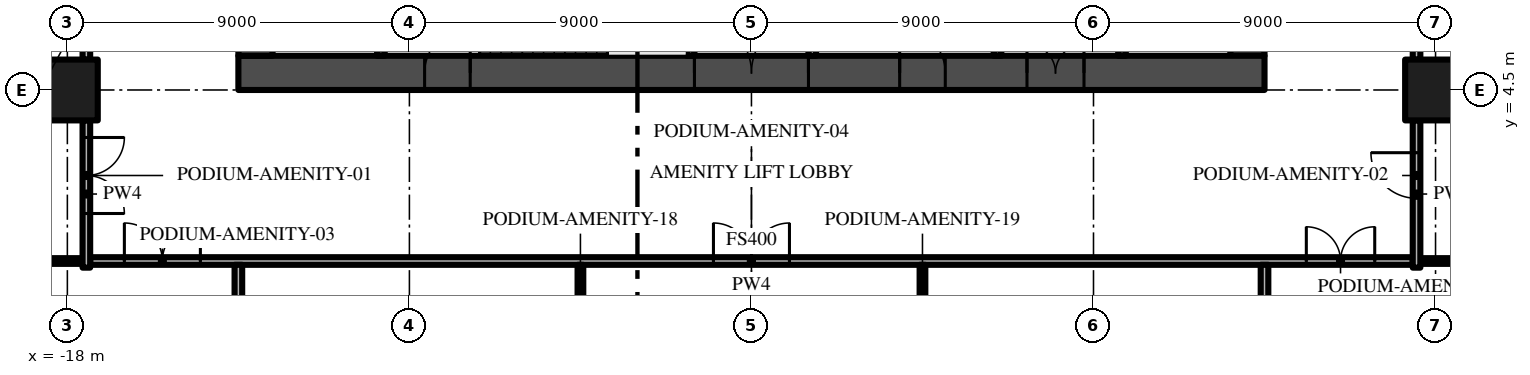
"""IFC4 building model, lengths in metres.
Left out: names, types, materials, properties, quantities, classifications, styles, units other than length and angle.
Written with IfcOpenShell. Run it as: python <this file> out.ifc"""

import sys

from ifc_helpers import new_model, si_unit, direction, frame, frame_2d, origin, origin_2d, place, context, subcontext, project, spatial, rectangle, extrude, element, fill, save


model = new_model("IFC4")
c1 = context("Model", 3, precision=1e-05, world=origin(), true_north=direction((0.0, 1.0)))
c2 = subcontext(c1, "Body", "Model", "MODEL_VIEW")
j1 = project(units=[si_unit("LENGTHUNIT", "METRE"), si_unit("PLANEANGLEUNIT", "RADIAN")], contexts=[c1])
p1 = place(None, origin())
s1 = spatial("IfcSite", under=j1, at=p1, CompositionType="ELEMENT")
p2 = place(p1, origin())
s2 = spatial("IfcBuilding", under=s1, at=p2, CompositionType="ELEMENT")
p3 = place(p2, frame((0.0, 0.0, 6.0)))
s3 = spatial("IfcBuildingStorey", under=s2, at=p3, CompositionType="ELEMENT", Elevation=6.0)
p4 = place(p3, frame((-13.5, 4.95, -0.4), z_axis=(0.0, 0.0, 1.0), x_axis=(1.0, 0.0, 0.0)))
e1 = element("IfcWall", 1, at=p4, inside=s3, PredefinedType="SHEAR", context=c2, shape_type="SweptSolid", body=[
    extrude(rectangle(XDim=27.0, YDim=0.9, at=frame_2d((13.5, 0.0))), origin(), (0.0, 0.0, 1.0), 4.55),
])
p5 = place(p4, frame((12.0, 0.0, 0.4)))
e2 = element("IfcOpeningElement", 2, at=p5, cuts=e1, PredefinedType="OPENING", context=c2, shape_type="SweptSolid", body=[
    extrude(rectangle(XDim=3.0, YDim=2.4, at=frame_2d((1.5, 1.2))), frame((0.0, 0.46, 0.0), z_axis=(0.0, -1.0, 0.0), x_axis=(1.0, 0.0, 0.0)), (0.0, 0.0, 1.0), 0.92),
])
p6 = place(p4, frame((4.9, 0.0, 0.4)))
e3 = element("IfcOpeningElement", 3, at=p6, cuts=e1, PredefinedType="OPENING", context=c2, shape_type="SweptSolid", body=[
    extrude(rectangle(XDim=1.2, YDim=2.2, at=frame_2d((0.6, 1.1))), frame((0.0, 0.46, 0.0), z_axis=(0.0, -1.0, 0.0), x_axis=(1.0, 0.0, 0.0)), (0.0, 0.0, 1.0), 0.92),
])
p7 = place(p4, frame((20.75, 0.0, 0.4)))
e4 = element("IfcOpeningElement", 4, at=p7, cuts=e1, PredefinedType="OPENING", context=c2, shape_type="SweptSolid", body=[
    extrude(rectangle(XDim=1.5, YDim=2.2, at=frame_2d((0.75, 1.1))), frame((0.0, 0.46, 0.0), z_axis=(0.0, -1.0, 0.0), x_axis=(1.0, 0.0, 0.0)), (0.0, 0.0, 1.0), 0.92),
])
p8 = place(p4, frame((17.4, 0.0, 0.4)))
e5 = element("IfcOpeningElement", 5, at=p8, cuts=e1, PredefinedType="OPENING", context=c2, shape_type="SweptSolid", body=[
    extrude(rectangle(XDim=1.2, YDim=2.2, at=frame_2d((0.6, 1.1))), frame((0.0, 0.46, 0.0), z_axis=(0.0, -1.0, 0.0), x_axis=(1.0, 0.0, 0.0)), (0.0, 0.0, 1.0), 0.92),
])
p9 = place(p3, frame((13.05, 5.4, -0.4), z_axis=(0.0, 0.0, 1.0), x_axis=(0.0, 1.0, 0.0)))
e6 = element("IfcWall", 6, at=p9, inside=s3, PredefinedType="SHEAR", context=c2, shape_type="SweptSolid", body=[
    extrude(rectangle(XDim=16.2, YDim=0.9, at=frame_2d((8.1, 0.0))), origin(), (0.0, 0.0, 1.0), 4.55),
])
p10 = place(p9, frame((6.0, 0.0, 0.4)))
e7 = element("IfcOpeningElement", 7, at=p10, cuts=e6, PredefinedType="OPENING", context=c2, shape_type="SweptSolid", body=[
    extrude(rectangle(XDim=1.2, YDim=2.2, at=frame_2d((0.6, 1.1))), frame((0.0, 0.46, 0.0), z_axis=(0.0, -1.0, 0.0), x_axis=(1.0, 0.0, 0.0)), (0.0, 0.0, 1.0), 0.92),
])
p11 = place(p3, frame((-13.05, 21.6, -0.4), z_axis=(0.0, 0.0, 1.0), x_axis=(0.0, -1.0, 0.0)))
e8 = element("IfcWall", 8, at=p11, inside=s3, PredefinedType="SHEAR", context=c2, shape_type="SweptSolid", body=[
    extrude(rectangle(XDim=16.2, YDim=0.9, at=frame_2d((8.1, 0.0))), origin(), (0.0, 0.0, 1.0), 4.55),
])
p12 = place(p11, frame((9.0, 0.0, 0.4)))
e9 = element("IfcOpeningElement", 9, at=p12, cuts=e8, PredefinedType="OPENING", context=c2, shape_type="SweptSolid", body=[
    extrude(rectangle(XDim=1.2, YDim=2.2, at=frame_2d((0.6, 1.1))), frame((0.0, 0.46, 0.0), z_axis=(0.0, -1.0, 0.0), x_axis=(1.0, 0.0, 0.0)), (0.0, 0.0, 1.0), 0.92),
])
for number, where, z_axis, x_axis in (
    (10, (-18.0, 4.5, 0.0), (0.0, 0.0, 1.0), (1.0, 0.0, 0.0)),
    (11, (18.0, 4.5, 0.0), (0.0, 0.0, 1.0), (1.0, 0.0, 0.0)),
):
    element("IfcColumn", number, at=place(p3, frame(where, z_axis=z_axis, x_axis=x_axis)), inside=s3, PredefinedType="COLUMN", context=c2, shape_type="SweptSolid", body=[
        extrude(rectangle(XDim=1.6, YDim=1.6, at=origin_2d()), origin(), (0.0, 0.0, 1.0), 4.15),
    ])
for number, where, z_axis, x_axis in (
    (12, (-9.75, 5.4, 0.0), (0.0, 0.0, 1.0), (0.0, 1.0, 0.0)),
    (13, (-1.6, 5.4, 0.0), (0.0, 0.0, 1.0), (0.0, 1.0, 0.0)),
):
    element("IfcWall", number, at=place(p3, frame(where, z_axis=z_axis, x_axis=x_axis)), inside=s3, PredefinedType="SHEAR", context=c2, shape_type="SweptSolid", body=[
        extrude(rectangle(XDim=2.55, YDim=0.2, at=frame_2d((1.275, 0.0))), origin(), (0.0, 0.0, 1.0), 4.15),
    ])
p13 = place(p3, frame((1.6, 7.5, 0.0), z_axis=(0.0, 0.0, 1.0), x_axis=(0.0, -1.0, 0.0)))
e14 = element("IfcWall", 14, at=p13, inside=s3, PredefinedType="PARTITIONING", context=c2, shape_type="SweptSolid", body=[
    extrude(rectangle(XDim=2.1, YDim=0.2, at=frame_2d((1.05, 0.0))), origin(), (0.0, 0.0, 1.0), 4.15),
])
p14 = place(p13, frame((0.25, 0.0, 0.0)))
e15 = element("IfcOpeningElement", 15, at=p14, cuts=e14, PredefinedType="OPENING", context=c2, shape_type="SweptSolid", body=[
    extrude(rectangle(XDim=0.9, YDim=2.1, at=frame_2d((0.45, 1.05))), frame((0.0, 0.11, 0.0), z_axis=(0.0, -1.0, 0.0), x_axis=(1.0, 0.0, 0.0)), (0.0, 0.0, 1.0), 0.22),
])
p15 = place(p3, frame((6.475, 5.4, 0.0), z_axis=(0.0, 0.0, 1.0), x_axis=(0.0, 1.0, 0.0)))
e16 = element("IfcWall", 16, at=p15, inside=s3, PredefinedType="SHEAR", context=c2, shape_type="SweptSolid", body=[
    extrude(rectangle(XDim=2.1, YDim=0.2, at=frame_2d((1.05, 0.0))), origin(), (0.0, 0.0, 1.0), 4.15),
])
p16 = place(p3, frame((9.75, 5.4, 0.0), z_axis=(0.0, 0.0, 1.0), x_axis=(0.0, 1.0, 0.0)))
e17 = element("IfcWall", 17, at=p16, inside=s3, PredefinedType="SHEAR", context=c2, shape_type="SweptSolid", body=[
    extrude(rectangle(XDim=2.2, YDim=0.2, at=frame_2d((1.1, 0.0))), origin(), (0.0, 0.0, 1.0), 4.15),
])
p17 = place(p16, frame((0.55, 0.0, 0.0)))
e18 = element("IfcOpeningElement", 18, at=p17, cuts=e17, PredefinedType="OPENING", context=c2, shape_type="SweptSolid", body=[
    extrude(rectangle(XDim=1.1, YDim=2.1, at=frame_2d((0.55, 1.05))), frame((0.0, 0.11, 0.0), z_axis=(0.0, -1.0, 0.0), x_axis=(1.0, 0.0, 0.0)), (0.0, 0.0, 1.0), 0.22),
])
p18 = place(p3, frame((-17.4, 0.0, 0.0), z_axis=(0.0, 0.0, 1.0), x_axis=(1.0, 0.0, 0.0)))
e19 = element("IfcWall", 19, at=p18, inside=s3, PredefinedType="PARTITIONING", context=c2, shape_type="SweptSolid", body=[
    extrude(rectangle(XDim=34.8, YDim=0.2, at=frame_2d((17.4, 0.0))), origin(), (0.0, 0.0, 1.0), 4.15),
])
p19 = place(p18, frame((0.9, 0.0, 0.0)))
e20 = element("IfcOpeningElement", 20, at=p19, cuts=e19, PredefinedType="OPENING", context=c2, shape_type="SweptSolid", body=[
    extrude(rectangle(XDim=2.0, YDim=2.4, at=frame_2d((1.0, 1.2))), frame((0.0, 0.11, 0.0), z_axis=(0.0, -1.0, 0.0), x_axis=(1.0, 0.0, 0.0)), (0.0, 0.0, 1.0), 0.22),
])
p20 = place(p18, frame((16.4, 0.0, 0.0)))
e21 = element("IfcOpeningElement", 21, at=p20, cuts=e19, PredefinedType="OPENING", context=c2, shape_type="SweptSolid", body=[
    extrude(rectangle(XDim=2.0, YDim=2.4, at=frame_2d((1.0, 1.2))), frame((0.0, 0.11, 0.0), z_axis=(0.0, -1.0, 0.0), x_axis=(1.0, 0.0, 0.0)), (0.0, 0.0, 1.0), 0.22),
])
p21 = place(p18, frame((32.0, 0.0, 0.0)))
e22 = element("IfcOpeningElement", 22, at=p21, cuts=e19, PredefinedType="OPENING", context=c2, shape_type="SweptSolid", body=[
    extrude(rectangle(XDim=1.8, YDim=2.4, at=frame_2d((0.9, 1.2))), frame((0.0, 0.11, 0.0), z_axis=(0.0, -1.0, 0.0), x_axis=(1.0, 0.0, 0.0)), (0.0, 0.0, 1.0), 0.22),
])
for number, where, z_axis, x_axis in (
    (23, (-35.7, 0.0, 0.0), (0.0, 0.0, 1.0), (1.0, 0.0, 0.0)),
    (24, (17.6, 0.0, 0.0), (0.0, 0.0, 1.0), (1.0, 0.0, 0.0)),
):
    element("IfcWall", number, at=place(p3, frame(where, z_axis=z_axis, x_axis=x_axis)), inside=s3, PredefinedType="PARTITIONING", context=c2, shape_type="SweptSolid", body=[
        extrude(rectangle(XDim=18.1, YDim=0.15, at=frame_2d((9.05, 0.0))), origin(), (0.0, 0.0, 1.0), 4.15),
    ])
p22 = place(p3, frame((-17.5, 3.7, 0.0), z_axis=(0.0, 0.0, 1.0), x_axis=(0.0, -1.0, 0.0)))
e25 = element("IfcWall", 25, at=p22, inside=s3, PredefinedType="PARTITIONING", context=c2, shape_type="SweptSolid", body=[
    extrude(rectangle(XDim=3.875, YDim=0.2, at=frame_2d((1.938, 0.0))), origin(), (0.0, 0.0, 1.0), 4.15),
])
p23 = place(p22, frame((0.45, 0.0, 0.0)))
e26 = element("IfcOpeningElement", 26, at=p23, cuts=e25, PredefinedType="OPENING", context=c2, shape_type="SweptSolid", body=[
    extrude(rectangle(XDim=2.0, YDim=2.4, at=frame_2d((1.0, 1.2))), frame((0.0, 0.11, 0.0), z_axis=(0.0, -1.0, 0.0), x_axis=(1.0, 0.0, 0.0)), (0.0, 0.0, 1.0), 0.22),
])
p24 = place(p3, frame((-17.5, 12.7, 0.0), z_axis=(0.0, 0.0, 1.0), x_axis=(0.0, -1.0, 0.0)))
e27 = element("IfcWall", 27, at=p24, inside=s3, PredefinedType="PARTITIONING", context=c2, shape_type="SweptSolid", body=[
    extrude(rectangle(XDim=7.4, YDim=0.2, at=frame_2d((3.7, 0.0))), origin(), (0.0, 0.0, 1.0), 4.15),
])
p25 = place(p24, frame((5.5, 0.0, 0.0)))
e28 = element("IfcOpeningElement", 28, at=p25, cuts=e27, PredefinedType="OPENING", context=c2, shape_type="SweptSolid", body=[
    extrude(rectangle(XDim=0.9, YDim=2.1, at=frame_2d((0.45, 1.05))), frame((0.0, 0.11, 0.0), z_axis=(0.0, -1.0, 0.0), x_axis=(1.0, 0.0, 0.0)), (0.0, 0.0, 1.0), 0.22),
])
p26 = place(p24, frame((0.15, 0.0, 0.0)))
e29 = element("IfcOpeningElement", 29, at=p26, cuts=e27, PredefinedType="OPENING", context=c2, shape_type="SweptSolid", body=[
    extrude(rectangle(XDim=0.9, YDim=2.1, at=frame_2d((0.45, 1.05))), frame((0.0, 0.11, 0.0), z_axis=(0.0, -1.0, 0.0), x_axis=(1.0, 0.0, 0.0)), (0.0, 0.0, 1.0), 0.22),
])
p27 = place(p3, frame((-13.5, -31.2, 0.0), z_axis=(0.0, 0.0, 1.0), x_axis=(0.0, 1.0, 0.0)))
e30 = element("IfcWall", 30, at=p27, inside=s3, PredefinedType="PARTITIONING", context=c2, shape_type="SweptSolid", body=[
    extrude(rectangle(XDim=31.1, YDim=0.2, at=frame_2d((15.55, 0.0))), origin(), (0.0, 0.0, 1.0), 4.15),
])
p28 = place(p3, frame((-4.5, -0.1, 0.0), z_axis=(0.0, 0.0, 1.0), x_axis=(0.0, -1.0, 0.0)))
e31 = element("IfcWall", 31, at=p28, inside=s3, PredefinedType="PARTITIONING", context=c2, shape_type="SweptSolid", body=[
    extrude(rectangle(XDim=4.325, YDim=0.15, at=frame_2d((2.163, 0.0))), origin(), (0.0, 0.0, 1.0), 4.15),
])
p29 = place(p28, frame((1.675, 0.0, 0.0)))
e32 = element("IfcOpeningElement", 32, at=p29, cuts=e31, PredefinedType="OPENING", context=c2, shape_type="SweptSolid", body=[
    extrude(rectangle(XDim=1.0, YDim=2.4, at=frame_2d((0.5, 1.2))), frame((0.0, 0.085, 0.0), z_axis=(0.0, -1.0, 0.0), x_axis=(1.0, 0.0, 0.0)), (0.0, 0.0, 1.0), 0.17),
])
p30 = place(p3, frame((4.5, -4.425, 0.0), z_axis=(0.0, 0.0, 1.0), x_axis=(0.0, 1.0, 0.0)))
e33 = element("IfcWall", 33, at=p30, inside=s3, PredefinedType="PARTITIONING", context=c2, shape_type="SweptSolid", body=[
    extrude(rectangle(XDim=4.325, YDim=0.15, at=frame_2d((2.163, 0.0))), origin(), (0.0, 0.0, 1.0), 4.15),
])
p31 = place(p30, frame((1.65, 0.0, 0.0)))
e34 = element("IfcOpeningElement", 34, at=p31, cuts=e33, PredefinedType="OPENING", context=c2, shape_type="SweptSolid", body=[
    extrude(rectangle(XDim=1.0, YDim=2.4, at=frame_2d((0.5, 1.2))), frame((0.0, 0.085, 0.0), z_axis=(0.0, -1.0, 0.0), x_axis=(1.0, 0.0, 0.0)), (0.0, 0.0, 1.0), 0.17),
])
p32 = place(p3, frame((13.5, -31.2, 0.0), z_axis=(0.0, 0.0, 1.0), x_axis=(0.0, 1.0, 0.0)))
e35 = element("IfcWall", 35, at=p32, inside=s3, PredefinedType="PARTITIONING", context=c2, shape_type="SweptSolid", body=[
    extrude(rectangle(XDim=31.1, YDim=0.2, at=frame_2d((15.55, 0.0))), origin(), (0.0, 0.0, 1.0), 4.15),
])
p33 = place(p3, frame((17.5, -0.175, 0.0), z_axis=(0.0, 0.0, 1.0), x_axis=(0.0, 1.0, 0.0)))
e36 = element("IfcWall", 36, at=p33, inside=s3, PredefinedType="PARTITIONING", context=c2, shape_type="SweptSolid", body=[
    extrude(rectangle(XDim=3.875, YDim=0.2, at=frame_2d((1.938, 0.0))), origin(), (0.0, 0.0, 1.0), 4.15),
])
p34 = place(p33, frame((1.825, 0.0, 0.0)))
e37 = element("IfcOpeningElement", 37, at=p34, cuts=e36, PredefinedType="OPENING", context=c2, shape_type="SweptSolid", body=[
    extrude(rectangle(XDim=1.2, YDim=2.4, at=frame_2d((0.6, 1.2))), frame((0.0, 0.11, 0.0), z_axis=(0.0, -1.0, 0.0), x_axis=(1.0, 0.0, 0.0)), (0.0, 0.0, 1.0), 0.22),
])
p35 = place(p3, frame((17.5, 5.3, 0.0), z_axis=(0.0, 0.0, 1.0), x_axis=(0.0, 1.0, 0.0)))
e38 = element("IfcWall", 38, at=p35, inside=s3, PredefinedType="PARTITIONING", context=c2, shape_type="SweptSolid", body=[
    extrude(rectangle(XDim=7.4, YDim=0.2, at=frame_2d((3.7, 0.0))), origin(), (0.0, 0.0, 1.0), 4.15),
])
p36 = place(p35, frame((6.05, 0.0, 0.0)))
e39 = element("IfcOpeningElement", 39, at=p36, cuts=e38, PredefinedType="OPENING", context=c2, shape_type="SweptSolid", body=[
    extrude(rectangle(XDim=1.2, YDim=2.4, at=frame_2d((0.6, 1.2))), frame((0.0, 0.11, 0.0), z_axis=(0.0, -1.0, 0.0), x_axis=(1.0, 0.0, 0.0)), (0.0, 0.0, 1.0), 0.22),
])
p37 = place(p5, frame((3.0, 0.0, 0.0), z_axis=(0.0, 0.0, 1.0), x_axis=(-1.0, 0.0, 0.0)))
e40 = element("IfcDoor", 40, at=p37, inside=s3, OperationType="DOUBLE_DOOR_SINGLE_SWING", PredefinedType="DOOR", context=c2, shape_type="SweptSolid", body=[
    extrude(rectangle(XDim=3.0, YDim=2.4, at=frame_2d((1.5, 1.2))), frame((0.0, 0.025, 0.0), z_axis=(0.0, -1.0, 0.0), x_axis=(1.0, 0.0, 0.0)), (0.0, 0.0, 1.0), 0.05),
])
fill(e2, e40)
p38 = place(p6, frame((1.2, 0.0, 0.0), z_axis=(0.0, 0.0, 1.0), x_axis=(-1.0, 0.0, 0.0)))
e41 = element("IfcDoor", 41, at=p38, inside=s3, OperationType="SINGLE_SWING_LEFT", PredefinedType="DOOR", context=c2, shape_type="SweptSolid", body=[
    extrude(rectangle(XDim=1.2, YDim=2.2, at=frame_2d((0.6, 1.1))), frame((0.0, 0.025, 0.0), z_axis=(0.0, -1.0, 0.0), x_axis=(1.0, 0.0, 0.0)), (0.0, 0.0, 1.0), 0.05),
])
fill(e3, e41)
p39 = place(p7, frame((1.5, 0.0, 0.0), z_axis=(0.0, 0.0, 1.0), x_axis=(-1.0, 0.0, 0.0)))
e42 = element("IfcDoor", 42, at=p39, inside=s3, OperationType="DOUBLE_DOOR_SINGLE_SWING", PredefinedType="DOOR", context=c2, shape_type="SweptSolid", body=[
    extrude(rectangle(XDim=1.5, YDim=2.2, at=frame_2d((0.75, 1.1))), frame((0.0, 0.025, 0.0), z_axis=(0.0, -1.0, 0.0), x_axis=(1.0, 0.0, 0.0)), (0.0, 0.0, 1.0), 0.05),
])
fill(e4, e42)
p40 = place(p8, frame((1.2, 0.0, 0.0), z_axis=(0.0, 0.0, 1.0), x_axis=(-1.0, 0.0, 0.0)))
e43 = element("IfcDoor", 43, at=p40, inside=s3, OperationType="SINGLE_SWING_RIGHT", PredefinedType="DOOR", context=c2, shape_type="SweptSolid", body=[
    extrude(rectangle(XDim=1.2, YDim=2.2, at=frame_2d((0.6, 1.1))), frame((0.0, 0.025, 0.0), z_axis=(0.0, -1.0, 0.0), x_axis=(1.0, 0.0, 0.0)), (0.0, 0.0, 1.0), 0.05),
])
fill(e5, e43)
p41 = place(p23, origin())
e44 = element("IfcDoor", 44, at=p41, inside=s3, OperationType="DOUBLE_DOOR_SINGLE_SWING", PredefinedType="DOOR", context=c2, shape_type="SweptSolid", body=[
    extrude(rectangle(XDim=2.0, YDim=2.4, at=frame_2d((1.0, 1.2))), frame((0.0, 0.025, 0.0), z_axis=(0.0, -1.0, 0.0), x_axis=(1.0, 0.0, 0.0)), (0.0, 0.0, 1.0), 0.05),
])
fill(e26, e44)
p42 = place(p34, origin())
e45 = element("IfcDoor", 45, at=p42, inside=s3, OperationType="SINGLE_SWING_RIGHT", PredefinedType="DOOR", context=c2, shape_type="SweptSolid", body=[
    extrude(rectangle(XDim=1.2, YDim=2.4, at=frame_2d((0.6, 1.2))), frame((0.0, 0.025, 0.0), z_axis=(0.0, -1.0, 0.0), x_axis=(1.0, 0.0, 0.0)), (0.0, 0.0, 1.0), 0.05),
])
fill(e37, e45)
p43 = place(p19, origin())
e46 = element("IfcDoor", 46, at=p43, inside=s3, OperationType="DOUBLE_DOOR_SINGLE_SWING", PredefinedType="DOOR", context=c2, shape_type="SweptSolid", body=[
    extrude(rectangle(XDim=2.0, YDim=2.4, at=frame_2d((1.0, 1.2))), frame((0.0, 0.025, 0.0), z_axis=(0.0, -1.0, 0.0), x_axis=(1.0, 0.0, 0.0)), (0.0, 0.0, 1.0), 0.05),
])
fill(e20, e46)
p44 = place(p20, origin())
e47 = element("IfcDoor", 47, at=p44, inside=s3, OperationType="DOUBLE_DOOR_SINGLE_SWING", PredefinedType="DOOR", context=c2, shape_type="SweptSolid", body=[
    extrude(rectangle(XDim=2.0, YDim=2.4, at=frame_2d((1.0, 1.2))), frame((0.0, 0.025, 0.0), z_axis=(0.0, -1.0, 0.0), x_axis=(1.0, 0.0, 0.0)), (0.0, 0.0, 1.0), 0.05),
])
fill(e21, e47)
p45 = place(p21, origin())
e48 = element("IfcDoor", 48, at=p45, inside=s3, OperationType="DOUBLE_DOOR_SINGLE_SWING", PredefinedType="DOOR", context=c2, shape_type="SweptSolid", body=[
    extrude(rectangle(XDim=1.8, YDim=2.4, at=frame_2d((0.9, 1.2))), frame((0.0, 0.025, 0.0), z_axis=(0.0, -1.0, 0.0), x_axis=(1.0, 0.0, 0.0)), (0.0, 0.0, 1.0), 0.05),
])
fill(e22, e48)
save(model, sys.argv[1])
